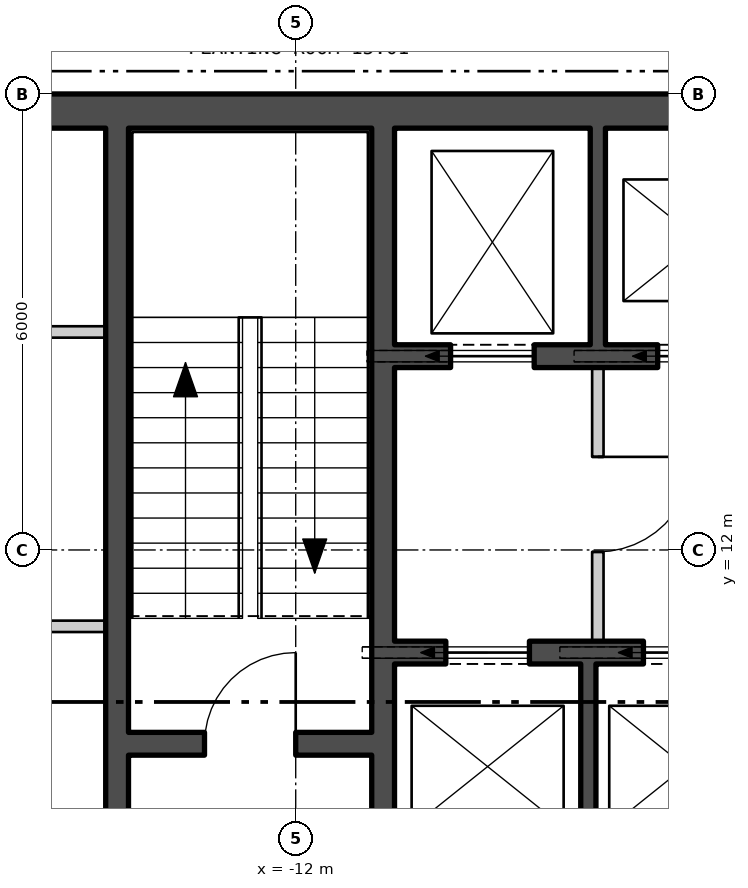
"""IFC4 building model, lengths in metres.
Left out: names, types, materials, properties, quantities, classifications, styles, units other than length and angle.
Written with IfcOpenShell. Run it as: python <this file> out.ifc"""

import sys

from ifc_helpers import new_model, si_unit, direction, frame, frame_2d, origin, place, context, subcontext, project, spatial, polyline, rectangle, outline, extrude, element, fill, save


model = new_model("IFC4")
c1 = context("Model", 3, precision=1e-05, world=origin(), true_north=direction((0.0, 1.0)))
c2 = subcontext(c1, "Body", "Model", "MODEL_VIEW")
j1 = project(units=[si_unit("LENGTHUNIT", "METRE"), si_unit("PLANEANGLEUNIT", "RADIAN")], contexts=[c1])
p1 = place(None, origin())
s1 = spatial("IfcSite", under=j1, at=p1, CompositionType="ELEMENT")
p2 = place(p1, origin())
s2 = spatial("IfcBuilding", under=s1, at=p2, CompositionType="ELEMENT")
p3 = place(p2, frame((0.0, 0.0, 204.3)))
s3 = spatial("IfcBuildingStorey", under=s2, at=p3, CompositionType="ELEMENT", Elevation=204.3)
p4 = place(p3, frame((-26.385, 13.887, -0.18), z_axis=(0.0, 0.0, 1.0), x_axis=(0.499999764979, -0.866025539474, 0.0)))
e1 = element("IfcWall", 1, at=p4, inside=s3, PredefinedType="SOLIDWALL", context=c2, shape_type="SweptSolid", body=[
    extrude(outline(polyline([(-0.13, -0.225), (45.87, -0.225), (45.61, 0.225), (0.13, 0.225), (-0.13, -0.225)])), origin(), (0.0, 0.0, 1.0), 3.68),
])
p5 = place(p4, frame((1.424, 0.0, 1.08)))
e2 = element("IfcOpeningElement", 2, at=p5, cuts=e1, PredefinedType="OPENING", context=c2, shape_type="SweptSolid", body=[
    extrude(rectangle(XDim=2.4, YDim=2.0, at=frame_2d((1.2, 1.0))), frame((0.0, 0.235, 0.0), z_axis=(0.0, -1.0, 0.0), x_axis=(1.0, 0.0, 0.0)), (0.0, 0.0, 1.0), 0.47),
])
p6 = place(p4, frame((5.893, 0.0, 1.08)))
e3 = element("IfcOpeningElement", 3, at=p6, cuts=e1, PredefinedType="OPENING", context=c2, shape_type="SweptSolid", body=[
    extrude(rectangle(XDim=2.4, YDim=2.0, at=frame_2d((1.2, 1.0))), frame((0.0, 0.235, 0.0), z_axis=(0.0, -1.0, 0.0), x_axis=(1.0, 0.0, 0.0)), (0.0, 0.0, 1.0), 0.47),
])
p7 = place(p4, frame((10.401, 0.0, 1.08)))
e4 = element("IfcOpeningElement", 4, at=p7, cuts=e1, PredefinedType="OPENING", context=c2, shape_type="SweptSolid", body=[
    extrude(rectangle(XDim=2.4, YDim=2.0, at=frame_2d((1.2, 1.0))), frame((0.0, 0.235, 0.0), z_axis=(0.0, -1.0, 0.0), x_axis=(1.0, 0.0, 0.0)), (0.0, 0.0, 1.0), 0.47),
])
p8 = place(p4, frame((14.909, 0.0, 1.08)))
e5 = element("IfcOpeningElement", 5, at=p8, cuts=e1, PredefinedType="OPENING", context=c2, shape_type="SweptSolid", body=[
    extrude(rectangle(XDim=2.4, YDim=2.0, at=frame_2d((1.2, 1.0))), frame((0.0, 0.235, 0.0), z_axis=(0.0, -1.0, 0.0), x_axis=(1.0, 0.0, 0.0)), (0.0, 0.0, 1.0), 0.47),
])
p9 = place(p4, frame((19.416, 0.0, 1.08)))
e6 = element("IfcOpeningElement", 6, at=p9, cuts=e1, PredefinedType="OPENING", context=c2, shape_type="SweptSolid", body=[
    extrude(rectangle(XDim=2.4, YDim=2.0, at=frame_2d((1.2, 1.0))), frame((0.0, 0.235, 0.0), z_axis=(0.0, -1.0, 0.0), x_axis=(1.0, 0.0, 0.0)), (0.0, 0.0, 1.0), 0.47),
])
p10 = place(p4, frame((23.924, 0.0, 1.08)))
e7 = element("IfcOpeningElement", 7, at=p10, cuts=e1, PredefinedType="OPENING", context=c2, shape_type="SweptSolid", body=[
    extrude(rectangle(XDim=2.4, YDim=2.0, at=frame_2d((1.2, 1.0))), frame((0.0, 0.235, 0.0), z_axis=(0.0, -1.0, 0.0), x_axis=(1.0, 0.0, 0.0)), (0.0, 0.0, 1.0), 0.47),
])
p11 = place(p4, frame((28.431, 0.0, 1.08)))
e8 = element("IfcOpeningElement", 8, at=p11, cuts=e1, PredefinedType="OPENING", context=c2, shape_type="SweptSolid", body=[
    extrude(rectangle(XDim=2.4, YDim=2.0, at=frame_2d((1.2, 1.0))), frame((0.0, 0.235, 0.0), z_axis=(0.0, -1.0, 0.0), x_axis=(1.0, 0.0, 0.0)), (0.0, 0.0, 1.0), 0.47),
])
p12 = place(p4, frame((32.939, 0.0, 1.08)))
e9 = element("IfcOpeningElement", 9, at=p12, cuts=e1, PredefinedType="OPENING", context=c2, shape_type="SweptSolid", body=[
    extrude(rectangle(XDim=2.4, YDim=2.0, at=frame_2d((1.2, 1.0))), frame((0.0, 0.235, 0.0), z_axis=(0.0, -1.0, 0.0), x_axis=(1.0, 0.0, 0.0)), (0.0, 0.0, 1.0), 0.47),
])
p13 = place(p4, frame((41.916, 0.0, 1.08)))
e10 = element("IfcOpeningElement", 10, at=p13, cuts=e1, PredefinedType="OPENING", context=c2, shape_type="SweptSolid", body=[
    extrude(rectangle(XDim=2.4, YDim=2.0, at=frame_2d((1.2, 1.0))), frame((0.0, 0.235, 0.0), z_axis=(0.0, -1.0, 0.0), x_axis=(1.0, 0.0, 0.0)), (0.0, 0.0, 1.0), 0.47),
])
p14 = place(p3, frame((-16.2, 17.775, 0.0), z_axis=(0.0, 0.0, 1.0), x_axis=(1.0, 0.0, 0.0)))
e11 = element("IfcWall", 11, at=p14, inside=s3, PredefinedType="SHEAR", context=c2, shape_type="SweptSolid", body=[
    extrude(rectangle(XDim=32.4, YDim=0.45, at=frame_2d((16.2, 0.0))), origin(), (0.0, 0.0, 1.0), 3.7),
])
p15 = place(p3, frame((-10.85, 2.45, 0.0), z_axis=(0.0, 0.0, 1.0), x_axis=(0.0, 1.0, 0.0)))
e12 = element("IfcWall", 12, at=p15, inside=s3, PredefinedType="SHEAR", context=c2, shape_type="SweptSolid", body=[
    extrude(rectangle(XDim=15.1, YDim=0.3, at=frame_2d((7.55, 0.0))), origin(), (0.0, 0.0, 1.0), 3.7),
])
p16 = place(p15, frame((3.525, 0.0, 0.0)))
e13 = element("IfcOpeningElement", 13, at=p16, cuts=e12, PredefinedType="OPENING", context=c2, shape_type="SweptSolid", body=[
    extrude(rectangle(XDim=1.25, YDim=2.1, at=frame_2d((0.625, 1.05))), frame((0.0, 0.16, 0.0), z_axis=(0.0, -1.0, 0.0), x_axis=(1.0, 0.0, 0.0)), (0.0, 0.0, 1.0), 0.32),
])
p17 = place(p15, frame((1.15, 0.0, 0.0)))
e14 = element("IfcOpeningElement", 14, at=p17, cuts=e12, PredefinedType="OPENING", context=c2, shape_type="SweptSolid", body=[
    extrude(rectangle(XDim=1.0, YDim=2.1, at=frame_2d((0.5, 1.05))), frame((0.0, 0.16, 0.0), z_axis=(0.0, -1.0, 0.0), x_axis=(1.0, 0.0, 0.0)), (0.0, 0.0, 1.0), 0.32),
])
p18 = place(p3, frame((-14.35, 2.45, 0.0), z_axis=(0.0, 0.0, 1.0), x_axis=(0.0, 1.0, 0.0)))
e15 = element("IfcWall", 15, at=p18, inside=s3, PredefinedType="SHEAR", context=c2, shape_type="SweptSolid", body=[
    extrude(rectangle(XDim=15.1, YDim=0.3, at=frame_2d((7.55, 0.0))), origin(), (0.0, 0.0, 1.0), 3.7),
])
p19 = place(p18, frame((4.4, 0.0, 0.0)))
e16 = element("IfcOpeningElement", 16, at=p19, cuts=e15, PredefinedType="OPENING", context=c2, shape_type="SweptSolid", body=[
    extrude(rectangle(XDim=1.5, YDim=2.1, at=frame_2d((0.75, 1.05))), frame((0.0, 0.16, 0.0), z_axis=(0.0, -1.0, 0.0), x_axis=(1.0, 0.0, 0.0)), (0.0, 0.0, 1.0), 0.32),
])
p20 = place(p3, frame((-14.2, 9.45, 0.0), z_axis=(0.0, 0.0, 1.0), x_axis=(1.0, 0.0, 0.0)))
e17 = element("IfcWall", 17, at=p20, inside=s3, PredefinedType="SHEAR", context=c2, shape_type="SweptSolid", body=[
    extrude(rectangle(XDim=3.2, YDim=0.3, at=frame_2d((1.6, 0.0))), origin(), (0.0, 0.0, 1.0), 3.7),
])
p21 = place(p20, frame((1.0, 0.0, 0.0)))
e18 = element("IfcOpeningElement", 18, at=p21, cuts=e17, PredefinedType="OPENING", context=c2, shape_type="SweptSolid", body=[
    extrude(rectangle(XDim=1.2, YDim=2.1, at=frame_2d((0.6, 1.05))), frame((0.0, 0.16, 0.0), z_axis=(0.0, -1.0, 0.0), x_axis=(1.0, 0.0, 0.0)), (0.0, 0.0, 1.0), 0.32),
])
p22 = place(p3, frame((-10.7, 14.55, 0.0), z_axis=(0.0, 0.0, 1.0), x_axis=(1.0, 0.0, 0.0)))
e19 = element("IfcWall", 19, at=p22, inside=s3, PredefinedType="SHEAR", context=c2, shape_type="SweptSolid", body=[
    extrude(rectangle(XDim=21.4, YDim=0.3, at=frame_2d((10.7, 0.0))), origin(), (0.0, 0.0, 1.0), 3.7),
])
p23 = place(p22, frame((0.738, 0.0, 0.0)))
e20 = element("IfcOpeningElement", 20, at=p23, cuts=e19, PredefinedType="OPENING", context=c2, shape_type="SweptSolid", body=[
    extrude(rectangle(XDim=1.1, YDim=2.1, at=frame_2d((0.55, 1.05))), frame((0.0, 0.16, 0.0), z_axis=(0.0, -1.0, 0.0), x_axis=(1.0, 0.0, 0.0)), (0.0, 0.0, 1.0), 0.32),
])
p24 = place(p22, frame((3.462, 0.0, 0.0)))
e21 = element("IfcOpeningElement", 21, at=p24, cuts=e19, PredefinedType="OPENING", context=c2, shape_type="SweptSolid", body=[
    extrude(rectangle(XDim=1.1, YDim=2.1, at=frame_2d((0.55, 1.05))), frame((0.0, 0.16, 0.0), z_axis=(0.0, -1.0, 0.0), x_axis=(1.0, 0.0, 0.0)), (0.0, 0.0, 1.0), 0.32),
])
p25 = place(p22, frame((6.138, 0.0, 0.0)))
e22 = element("IfcOpeningElement", 22, at=p25, cuts=e19, PredefinedType="OPENING", context=c2, shape_type="SweptSolid", body=[
    extrude(rectangle(XDim=1.1, YDim=2.1, at=frame_2d((0.55, 1.05))), frame((0.0, 0.16, 0.0), z_axis=(0.0, -1.0, 0.0), x_axis=(1.0, 0.0, 0.0)), (0.0, 0.0, 1.0), 0.32),
])
p26 = place(p22, frame((8.812, 0.0, 0.0)))
e23 = element("IfcOpeningElement", 23, at=p26, cuts=e19, PredefinedType="OPENING", context=c2, shape_type="SweptSolid", body=[
    extrude(rectangle(XDim=1.1, YDim=2.1, at=frame_2d((0.55, 1.05))), frame((0.0, 0.16, 0.0), z_axis=(0.0, -1.0, 0.0), x_axis=(1.0, 0.0, 0.0)), (0.0, 0.0, 1.0), 0.32),
])
p27 = place(p22, frame((19.562, 0.0, 0.0)))
e24 = element("IfcOpeningElement", 24, at=p27, cuts=e19, PredefinedType="OPENING", context=c2, shape_type="SweptSolid", body=[
    extrude(rectangle(XDim=1.1, YDim=2.1, at=frame_2d((0.55, 1.05))), frame((0.0, 0.16, 0.0), z_axis=(0.0, -1.0, 0.0), x_axis=(1.0, 0.0, 0.0)), (0.0, 0.0, 1.0), 0.32),
])
p28 = place(p22, frame((11.537, 0.0, 0.0)))
e25 = element("IfcOpeningElement", 25, at=p28, cuts=e19, PredefinedType="OPENING", context=c2, shape_type="SweptSolid", body=[
    extrude(rectangle(XDim=1.0, YDim=2.1, at=frame_2d((0.5, 1.05))), frame((0.0, 0.16, 0.0), z_axis=(0.0, -1.0, 0.0), x_axis=(1.0, 0.0, 0.0)), (0.0, 0.0, 1.0), 0.32),
])
p29 = place(p22, frame((15.55, 0.0, 0.0)))
e26 = element("IfcOpeningElement", 26, at=p29, cuts=e19, PredefinedType="OPENING", context=c2, shape_type="SweptSolid", body=[
    extrude(rectangle(XDim=1.0, YDim=2.1, at=frame_2d((0.5, 1.05))), frame((0.0, 0.16, 0.0), z_axis=(0.0, -1.0, 0.0), x_axis=(1.0, 0.0, 0.0)), (0.0, 0.0, 1.0), 0.32),
])
p30 = place(p3, frame((-10.7, 10.65, 0.0), z_axis=(0.0, 0.0, 1.0), x_axis=(1.0, 0.0, 0.0)))
e27 = element("IfcWall", 27, at=p30, inside=s3, PredefinedType="SHEAR", context=c2, shape_type="SweptSolid", body=[
    extrude(rectangle(XDim=10.3, YDim=0.3, at=frame_2d((5.15, 0.0))), origin(), (0.0, 0.0, 1.0), 3.7),
])
p31 = place(p30, frame((0.675, 0.0, 0.0)))
e28 = element("IfcOpeningElement", 28, at=p31, cuts=e27, PredefinedType="OPENING", context=c2, shape_type="SweptSolid", body=[
    extrude(rectangle(XDim=1.1, YDim=2.1, at=frame_2d((0.55, 1.05))), frame((0.0, 0.16, 0.0), z_axis=(0.0, -1.0, 0.0), x_axis=(1.0, 0.0, 0.0)), (0.0, 0.0, 1.0), 0.32),
])
p32 = place(p30, frame((3.275, 0.0, 0.0)))
e29 = element("IfcOpeningElement", 29, at=p32, cuts=e27, PredefinedType="OPENING", context=c2, shape_type="SweptSolid", body=[
    extrude(rectangle(XDim=1.1, YDim=2.1, at=frame_2d((0.55, 1.05))), frame((0.0, 0.16, 0.0), z_axis=(0.0, -1.0, 0.0), x_axis=(1.0, 0.0, 0.0)), (0.0, 0.0, 1.0), 0.32),
])
p33 = place(p30, frame((5.825, 0.0, 0.0)))
e30 = element("IfcOpeningElement", 30, at=p33, cuts=e27, PredefinedType="OPENING", context=c2, shape_type="SweptSolid", body=[
    extrude(rectangle(XDim=1.1, YDim=2.1, at=frame_2d((0.55, 1.05))), frame((0.0, 0.16, 0.0), z_axis=(0.0, -1.0, 0.0), x_axis=(1.0, 0.0, 0.0)), (0.0, 0.0, 1.0), 0.32),
])
p34 = place(p30, frame((8.425, 0.0, 0.0)))
e31 = element("IfcOpeningElement", 31, at=p34, cuts=e27, PredefinedType="OPENING", context=c2, shape_type="SweptSolid", body=[
    extrude(rectangle(XDim=1.0, YDim=2.1, at=frame_2d((0.5, 1.05))), frame((0.0, 0.16, 0.0), z_axis=(0.0, -1.0, 0.0), x_axis=(1.0, 0.0, 0.0)), (0.0, 0.0, 1.0), 0.32),
])
p35 = place(p3, frame((-8.025, 14.7, 0.0), z_axis=(0.0, 0.0, 1.0), x_axis=(0.0, 1.0, 0.0)))
e32 = element("IfcWall", 32, at=p35, inside=s3, PredefinedType="SHEAR", context=c2, shape_type="SweptSolid", body=[
    extrude(rectangle(XDim=2.85, YDim=0.2, at=frame_2d((1.425, 0.0))), origin(), (0.0, 0.0, 1.0), 3.7),
])
p36 = place(p3, frame((-8.15, 7.8, 0.0), z_axis=(0.0, 0.0, 1.0), x_axis=(0.0, 1.0, 0.0)))
e33 = element("IfcWall", 33, at=p36, inside=s3, PredefinedType="SHEAR", context=c2, shape_type="SweptSolid", body=[
    extrude(rectangle(XDim=2.7, YDim=0.2, at=frame_2d((1.35, 0.0))), origin(), (0.0, 0.0, 1.0), 3.7),
])
p37 = place(p3, frame((-8.025, 10.8, 0.0), z_axis=(0.0, 0.0, 1.0), x_axis=(0.0, 1.0, 0.0)))
e34 = element("IfcWall", 34, at=p37, inside=s3, PredefinedType="PARTITIONING", context=c2, shape_type="SweptSolid", body=[
    extrude(rectangle(XDim=3.6, YDim=0.15, at=frame_2d((1.8, 0.0))), origin(), (0.0, 0.0, 1.0), 3.7),
])
p38 = place(p37, frame((1.175, 0.0, 0.0)))
e35 = element("IfcOpeningElement", 35, at=p38, cuts=e34, PredefinedType="OPENING", context=c2, shape_type="SweptSolid", body=[
    extrude(rectangle(XDim=1.25, YDim=2.1, at=frame_2d((0.625, 1.05))), frame((0.0, 0.085, 0.0), z_axis=(0.0, -1.0, 0.0), x_axis=(1.0, 0.0, 0.0)), (0.0, 0.0, 1.0), 0.17),
])
for number, where, z_axis, x_axis in (
    (36, (-15.75, 10.995, 0.0), (0.0, 0.0, 1.0), (1.0, 0.0, 0.0)),
    (37, (-15.75, 14.869, 0.0), (0.0, 0.0, 1.0), (1.0, 0.0, 0.0)),
):
    element("IfcWall", number, at=place(p3, frame(where, z_axis=z_axis, x_axis=x_axis)), inside=s3, PredefinedType="PARTITIONING", context=c2, shape_type="SweptSolid", body=[
        extrude(rectangle(XDim=1.25, YDim=0.15, at=frame_2d((0.625, 0.0))), origin(), (0.0, 0.0, 1.0), 3.7),
    ])
p39 = place(p23, origin())
e38 = element("IfcDoor", 38, at=p39, inside=s3, OperationType="SLIDING_TO_LEFT", PredefinedType="DOOR", context=c2, shape_type="SweptSolid", body=[
    extrude(rectangle(XDim=1.1, YDim=2.1, at=frame_2d((0.55, 1.05))), frame((0.0, 0.025, 0.0), z_axis=(0.0, -1.0, 0.0), x_axis=(1.0, 0.0, 0.0)), (0.0, 0.0, 1.0), 0.05),
])
fill(e20, e38)
p40 = place(p24, origin())
e39 = element("IfcDoor", 39, at=p40, inside=s3, OperationType="SLIDING_TO_LEFT", PredefinedType="DOOR", context=c2, shape_type="SweptSolid", body=[
    extrude(rectangle(XDim=1.1, YDim=2.1, at=frame_2d((0.55, 1.05))), frame((0.0, 0.025, 0.0), z_axis=(0.0, -1.0, 0.0), x_axis=(1.0, 0.0, 0.0)), (0.0, 0.0, 1.0), 0.05),
])
fill(e21, e39)
p41 = place(p31, origin())
e40 = element("IfcDoor", 40, at=p41, inside=s3, OperationType="SLIDING_TO_LEFT", PredefinedType="DOOR", context=c2, shape_type="SweptSolid", body=[
    extrude(rectangle(XDim=1.1, YDim=2.1, at=frame_2d((0.55, 1.05))), frame((0.0, 0.025, 0.0), z_axis=(0.0, -1.0, 0.0), x_axis=(1.0, 0.0, 0.0)), (0.0, 0.0, 1.0), 0.05),
])
fill(e28, e40)
p42 = place(p32, origin())
e41 = element("IfcDoor", 41, at=p42, inside=s3, OperationType="SLIDING_TO_LEFT", PredefinedType="DOOR", context=c2, shape_type="SweptSolid", body=[
    extrude(rectangle(XDim=1.1, YDim=2.1, at=frame_2d((0.55, 1.05))), frame((0.0, 0.025, 0.0), z_axis=(0.0, -1.0, 0.0), x_axis=(1.0, 0.0, 0.0)), (0.0, 0.0, 1.0), 0.05),
])
fill(e29, e41)
p43 = place(p38, origin())
e42 = element("IfcDoor", 42, at=p43, inside=s3, OperationType="SINGLE_SWING_RIGHT", PredefinedType="DOOR", context=c2, shape_type="SweptSolid", body=[
    extrude(rectangle(XDim=1.25, YDim=2.1, at=frame_2d((0.625, 1.05))), frame((0.0, 0.025, 0.0), z_axis=(0.0, -1.0, 0.0), x_axis=(1.0, 0.0, 0.0)), (0.0, 0.0, 1.0), 0.05),
])
fill(e35, e42)
p44 = place(p21, origin())
e43 = element("IfcDoor", 43, at=p44, inside=s3, OperationType="SINGLE_SWING_LEFT", PredefinedType="DOOR", context=c2, shape_type="SweptSolid", body=[
    extrude(rectangle(XDim=1.2, YDim=2.1, at=frame_2d((0.6, 1.05))), frame((0.0, 0.025, 0.0), z_axis=(0.0, -1.0, 0.0), x_axis=(1.0, 0.0, 0.0)), (0.0, 0.0, 1.0), 0.05),
])
fill(e18, e43)
save(model, sys.argv[1])
